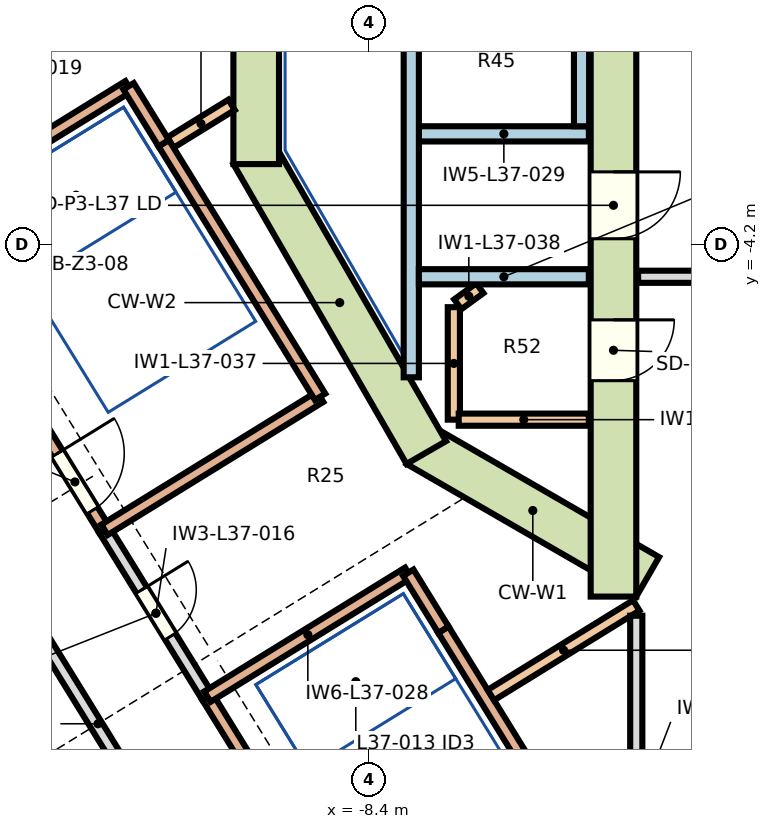
"""IFC4 building model, lengths in metres.
Left out: names, types, materials, properties, quantities, classifications, styles, units other than length and angle.
Written with IfcOpenShell. Run it as: python <this file> out.ifc"""

import sys

from ifc_helpers import new_model, si_unit, direction, frame, frame_2d, origin, place, context, subcontext, project, spatial, rectangle, extrude, element, fill, save


model = new_model("IFC4")
c1 = context("Model", 3, precision=1e-05, world=origin(), true_north=direction((0.0, 1.0)))
c2 = subcontext(c1, "Body", "Model", "MODEL_VIEW")
j1 = project(units=[si_unit("LENGTHUNIT", "METRE"), si_unit("PLANEANGLEUNIT", "RADIAN")], contexts=[c1])
p1 = place(None, origin())
s1 = spatial("IfcSite", under=j1, at=p1, CompositionType="ELEMENT")
p2 = place(p1, origin())
s2 = spatial("IfcBuilding", under=s1, at=p2, CompositionType="ELEMENT")
p3 = place(p2, frame((0.0, 0.0, 170.4)))
s3 = spatial("IfcBuildingStorey", under=s2, at=p3, CompositionType="ELEMENT", Elevation=170.4)
p4 = place(p3, frame((-3.812, -9.635, 0.0), z_axis=(0.0, 0.0, 1.0), x_axis=(-0.866013176292, 0.50002117804, 0.0)))
e1 = element("IfcWall", 1, at=p4, inside=s3, PredefinedType="SHEAR", context=c2, shape_type="SweptSolid", body=[
    extrude(rectangle(XDim=4.363, YDim=0.75, at=frame_2d((2.181, 0.0))), origin(), (0.0, 0.0, 1.0), 3.8),
])
p5 = place(p3, frame((-7.453, -7.591, 0.0), z_axis=(0.0, 0.0, 1.0), x_axis=(-0.500021842983, 0.866012792365, 0.0)))
e2 = element("IfcWall", 2, at=p5, inside=s3, PredefinedType="SHEAR", context=c2, shape_type="SweptSolid", body=[
    extrude(rectangle(XDim=5.694, YDim=0.75, at=frame_2d((2.847, 0.0))), origin(), (0.0, 0.0, 1.0), 3.8),
])
p6 = place(p3, frame((-10.25, -2.847, 0.0), z_axis=(0.0, 0.0, 1.0), x_axis=(0.0, 1.0, 0.0)))
e3 = element("IfcWall", 3, at=p6, inside=s3, PredefinedType="SHEAR", context=c2, shape_type="SweptSolid", body=[
    extrude(rectangle(XDim=5.694, YDim=0.75, at=frame_2d((2.847, 0.0))), origin(), (0.0, 0.0, 1.0), 3.8),
])
p7 = place(p3, frame((-4.375, 9.959, 0.0), z_axis=(0.0, 0.0, 1.0), x_axis=(0.0, -1.0, 0.0)))
e4 = element("IfcWall", 4, at=p7, inside=s3, PredefinedType="SHEAR", context=c2, shape_type="SweptSolid", body=[
    extrude(rectangle(XDim=19.919, YDim=0.75, at=frame_2d((9.959, 0.0))), origin(), (0.0, 0.0, 1.0), 3.8),
])
p8 = place(p7, frame((12.935, 0.0, 0.0)))
e5 = element("IfcOpeningElement", 5, at=p8, cuts=e4, PredefinedType="OPENING", context=c2, shape_type="SweptSolid", body=[
    extrude(rectangle(XDim=1.1, YDim=2.1, at=frame_2d((0.55, 1.05))), frame((0.0, 0.385, 0.0), z_axis=(0.0, -1.0, 0.0), x_axis=(1.0, 0.0, 0.0)), (0.0, 0.0, 1.0), 0.77),
])
p9 = place(p7, frame((15.368, 0.0, 0.0)))
e6 = element("IfcOpeningElement", 6, at=p9, cuts=e4, PredefinedType="OPENING", context=c2, shape_type="SweptSolid", body=[
    extrude(rectangle(XDim=1.0, YDim=2.1, at=frame_2d((0.5, 1.05))), frame((0.0, 0.385, 0.0), z_axis=(0.0, -1.0, 0.0), x_axis=(1.0, 0.0, 0.0)), (0.0, 0.0, 1.0), 0.77),
])
p10 = place(p7, frame((3.618, 0.0, 0.0)))
e7 = element("IfcOpeningElement", 7, at=p10, cuts=e4, PredefinedType="OPENING", context=c2, shape_type="SweptSolid", body=[
    extrude(rectangle(XDim=1.0, YDim=2.1, at=frame_2d((0.5, 1.05))), frame((0.0, 0.385, 0.0), z_axis=(0.0, -1.0, 0.0), x_axis=(1.0, 0.0, 0.0)), (0.0, 0.0, 1.0), 0.77),
])
p11 = place(p3, frame((-3.14, -18.444, 0.0), z_axis=(0.0, 0.0, 1.0), x_axis=(0.851111635158, 0.52498474692, 0.0)))
e8 = element("IfcWall", 8, at=p11, inside=s3, PredefinedType="SOLIDWALL", context=c2, shape_type="SweptSolid", body=[
    extrude(rectangle(XDim=16.39, YDim=0.25, at=frame_2d((8.195, 0.0))), origin(), (0.0, 0.0, 1.0), 3.5),
])
p12 = place(p11, frame((1.149, 0.0, 0.0)))
e9 = element("IfcOpeningElement", 9, at=p12, cuts=e8, PredefinedType="OPENING", context=c2, shape_type="SweptSolid", body=[
    extrude(rectangle(XDim=1.8, YDim=2.4, at=frame_2d((0.9, 1.2))), frame((0.0, 0.135, 0.0), z_axis=(0.0, -1.0, 0.0), x_axis=(1.0, 0.0, 0.0)), (0.0, 0.0, 1.0), 0.27),
])
p13 = place(p11, frame((5.246, 0.0, 0.0)))
e10 = element("IfcOpeningElement", 10, at=p13, cuts=e8, PredefinedType="OPENING", context=c2, shape_type="SweptSolid", body=[
    extrude(rectangle(XDim=1.8, YDim=2.4, at=frame_2d((0.9, 1.2))), frame((0.0, 0.135, 0.0), z_axis=(0.0, -1.0, 0.0), x_axis=(1.0, 0.0, 0.0)), (0.0, 0.0, 1.0), 0.27),
])
p14 = place(p11, frame((9.344, 0.0, 0.0)))
e11 = element("IfcOpeningElement", 11, at=p14, cuts=e8, PredefinedType="OPENING", context=c2, shape_type="SweptSolid", body=[
    extrude(rectangle(XDim=1.8, YDim=2.4, at=frame_2d((0.9, 1.2))), frame((0.0, 0.135, 0.0), z_axis=(0.0, -1.0, 0.0), x_axis=(1.0, 0.0, 0.0)), (0.0, 0.0, 1.0), 0.27),
])
p15 = place(p11, frame((13.441, 0.0, 0.0)))
e12 = element("IfcOpeningElement", 12, at=p15, cuts=e8, PredefinedType="OPENING", context=c2, shape_type="SweptSolid", body=[
    extrude(rectangle(XDim=1.8, YDim=2.4, at=frame_2d((0.9, 1.2))), frame((0.0, 0.135, 0.0), z_axis=(0.0, -1.0, 0.0), x_axis=(1.0, 0.0, 0.0)), (0.0, 0.0, 1.0), 0.27),
])
p16 = place(p3, frame((-22.037, 2.774, 0.0), z_axis=(0.0, 0.0, 1.0), x_axis=(0.524973936666, -0.85111830307, 0.0)))
e13 = element("IfcWall", 13, at=p16, inside=s3, PredefinedType="PARTITIONING", context=c2, shape_type="SweptSolid", body=[
    extrude(rectangle(XDim=27.98, YDim=0.2, at=frame_2d((13.99, 0.0))), origin(), (0.0, 0.0, 1.0), 3.55),
])
p17 = place(p16, frame((4.55, 0.0, 0.0)))
e14 = element("IfcOpeningElement", 14, at=p17, cuts=e13, PredefinedType="OPENING", context=c2, shape_type="SweptSolid", body=[
    extrude(rectangle(XDim=1.2, YDim=2.1, at=frame_2d((0.6, 1.05))), frame((0.0, 0.11, 0.0), z_axis=(0.0, -1.0, 0.0), x_axis=(1.0, 0.0, 0.0)), (0.0, 0.0, 1.0), 0.22),
])
p18 = place(p16, frame((14.085, 0.0, 0.0)))
e15 = element("IfcOpeningElement", 15, at=p18, cuts=e13, PredefinedType="OPENING", context=c2, shape_type="SweptSolid", body=[
    extrude(rectangle(XDim=1.0, YDim=2.1, at=frame_2d((0.5, 1.05))), frame((0.0, 0.11, 0.0), z_axis=(0.0, -1.0, 0.0), x_axis=(1.0, 0.0, 0.0)), (0.0, 0.0, 1.0), 0.22),
])
p19 = place(p16, frame((24.89, 0.0, 0.0)))
e16 = element("IfcOpeningElement", 16, at=p19, cuts=e13, PredefinedType="OPENING", context=c2, shape_type="SweptSolid", body=[
    extrude(rectangle(XDim=0.95, YDim=2.1, at=frame_2d((0.475, 1.05))), frame((0.0, 0.11, 0.0), z_axis=(0.0, -1.0, 0.0), x_axis=(1.0, 0.0, 0.0)), (0.0, 0.0, 1.0), 0.22),
])
p20 = place(p3, frame((-17.215, -10.759, 0.0), z_axis=(0.0, 0.0, 1.0), x_axis=(0.524974538192, -0.851117932046, 0.0)))
e17 = element("IfcWall", 17, at=p20, inside=s3, PredefinedType="PARTITIONING", context=c2, shape_type="SweptSolid", body=[
    extrude(rectangle(XDim=6.8, YDim=0.2, at=frame_2d((3.4, 0.0))), origin(), (0.0, 0.0, 1.0), 3.55),
])
p21 = place(p20, frame((2.39, 0.0, 0.0)))
e18 = element("IfcOpeningElement", 18, at=p21, cuts=e17, PredefinedType="OPENING", context=c2, shape_type="SweptSolid", body=[
    extrude(rectangle(XDim=0.9, YDim=2.1, at=frame_2d((0.45, 1.05))), frame((0.0, 0.11, 0.0), z_axis=(0.0, -1.0, 0.0), x_axis=(1.0, 0.0, 0.0)), (0.0, 0.0, 1.0), 0.22),
])
p22 = place(p20, frame((5.29, 0.0, 0.0)))
e19 = element("IfcOpeningElement", 19, at=p22, cuts=e17, PredefinedType="OPENING", context=c2, shape_type="SweptSolid", body=[
    extrude(rectangle(XDim=0.8, YDim=2.1, at=frame_2d((0.4, 1.05))), frame((0.0, 0.11, 0.0), z_axis=(0.0, -1.0, 0.0), x_axis=(1.0, 0.0, 0.0)), (0.0, 0.0, 1.0), 0.22),
])
p23 = place(p3, frame((-15.896, -3.755, 0.0), z_axis=(0.0, 0.0, 1.0), x_axis=(0.524982543144, -0.851112994493, 0.0)))
e20 = element("IfcWall", 20, at=p23, inside=s3, PredefinedType="SOLIDWALL", context=c2, shape_type="SweptSolid", body=[
    extrude(rectangle(XDim=6.0, YDim=0.2, at=frame_2d((3.0, 0.0))), origin(), (0.0, 0.0, 1.0), 3.55),
])
p24 = place(p23, frame((4.525, 0.0, 0.0)))
e21 = element("IfcOpeningElement", 21, at=p24, cuts=e20, PredefinedType="OPENING", context=c2, shape_type="SweptSolid", body=[
    extrude(rectangle(XDim=1.1, YDim=2.1, at=frame_2d((0.55, 1.05))), frame((0.0, 0.11, 0.0), z_axis=(0.0, -1.0, 0.0), x_axis=(1.0, 0.0, 0.0)), (0.0, 0.0, 1.0), 0.22),
])
p25 = place(p3, frame((-12.746, -8.861, 0.0), z_axis=(0.0, 0.0, 1.0), x_axis=(0.524959112102, -0.851127446756, 0.0)))
e22 = element("IfcWall", 22, at=p25, inside=s3, PredefinedType="PARTITIONING", context=c2, shape_type="SweptSolid", body=[
    extrude(rectangle(XDim=3.224, YDim=0.2, at=frame_2d((1.612, 0.0))), origin(), (0.0, 0.0, 1.0), 3.55),
])
p26 = place(p25, frame((1.162, 0.0, 0.0)))
e23 = element("IfcOpeningElement", 23, at=p26, cuts=e22, PredefinedType="OPENING", context=c2, shape_type="SweptSolid", body=[
    extrude(rectangle(XDim=0.9, YDim=2.1, at=frame_2d((0.45, 1.05))), frame((0.0, 0.11, 0.0), z_axis=(0.0, -1.0, 0.0), x_axis=(1.0, 0.0, 0.0)), (0.0, 0.0, 1.0), 0.22),
])
for number, where, z_axis, x_axis in (
    (24, (-12.746, -8.861, 0.0), (0.0, 0.0, 1.0), (0.851, 0.525, 0.0)),
    (25, (-12.349, -1.567, 0.0), (0.0, 0.0, 1.0), (-0.851, -0.525, 0.0)),
):
    element("IfcWall", number, at=place(p3, frame(where, z_axis=z_axis, x_axis=x_axis)), inside=s3, PredefinedType="SOLIDWALL", context=c2, shape_type="SweptSolid", body=[
        extrude(rectangle(XDim=4.167, YDim=0.2, at=frame_2d((2.083, 0.0))), origin(), (0.0, 0.0, 1.0), 3.55),
    ])
p27 = place(p3, frame((-11.053, -11.605, 0.0), z_axis=(0.0, 0.0, 1.0), x_axis=(0.524982543144, -0.851112994493, 0.0)))
e26 = element("IfcWall", 26, at=p27, inside=s3, PredefinedType="SOLIDWALL", context=c2, shape_type="SweptSolid", body=[
    extrude(rectangle(XDim=6.0, YDim=0.2, at=frame_2d((3.0, 0.0))), origin(), (0.0, 0.0, 1.0), 3.55),
])
p28 = place(p27, frame((4.525, 0.0, 0.0)))
e27 = element("IfcOpeningElement", 27, at=p28, cuts=e26, PredefinedType="OPENING", context=c2, shape_type="SweptSolid", body=[
    extrude(rectangle(XDim=1.1, YDim=2.1, at=frame_2d((0.55, 1.05))), frame((0.0, 0.11, 0.0), z_axis=(0.0, -1.0, 0.0), x_axis=(1.0, 0.0, 0.0)), (0.0, 0.0, 1.0), 0.22),
])
p29 = place(p3, frame((-10.655, -1.873, 0.0), z_axis=(0.0, 0.0, 1.0), x_axis=(-0.851083160227, -0.525030908021, 0.0)))
e28 = element("IfcWall", 28, at=p29, inside=s3, PredefinedType="PARTITIONING", context=c2, shape_type="SweptSolid", body=[
    extrude(rectangle(XDim=1.182, YDim=0.2, at=frame_2d((0.591, 0.0))), origin(), (0.0, 0.0, 1.0), 3.55),
])
p30 = place(p3, frame((-9.199, -6.674, 0.0), z_axis=(0.0, 0.0, 1.0), x_axis=(-0.524942245614, 0.851137849452, 0.0)))
e29 = element("IfcWall", 29, at=p30, inside=s3, PredefinedType="SOLIDWALL", context=c2, shape_type="SweptSolid", body=[
    extrude(rectangle(XDim=4.9, YDim=0.2, at=frame_2d((2.45, 0.0))), origin(), (0.0, 0.0, 1.0), 3.55),
])
p31 = place(p3, frame((-7.749, -9.567, 0.0), z_axis=(0.0, 0.0, 1.0), x_axis=(-0.851124503894, -0.524963883397, 0.0)))
e30 = element("IfcWall", 30, at=p31, inside=s3, PredefinedType="SOLIDWALL", context=c2, shape_type="SweptSolid", body=[
    extrude(rectangle(XDim=3.882, YDim=0.2, at=frame_2d((1.941, 0.0))), origin(), (0.0, 0.0, 1.0), 3.55),
])
p32 = place(p3, frame((-7.575, -2.35, 0.0), z_axis=(0.0, 0.0, 1.0), x_axis=(1.0, 0.0, 0.0)))
e31 = element("IfcWall", 31, at=p32, inside=s3, PredefinedType="SOLIDWALL", context=c2, shape_type="SweptSolid", body=[
    extrude(rectangle(XDim=2.795, YDim=0.25, at=frame_2d((1.397, 0.0))), origin(), (0.0, 0.0, 1.0), 3.55),
])
p33 = place(p3, frame((-7.7, 6.354, 0.0), z_axis=(0.0, 0.0, 1.0), x_axis=(0.0, -1.0, 0.0)))
e32 = element("IfcWall", 32, at=p33, inside=s3, PredefinedType="SOLIDWALL", context=c2, shape_type="SweptSolid", body=[
    extrude(rectangle(XDim=12.707, YDim=0.25, at=frame_2d((6.354, 0.0))), origin(), (0.0, 0.0, 1.0), 3.55),
])
p34 = place(p3, frame((-7.0, -7.05, 0.0), z_axis=(0.0, 0.0, 1.0), x_axis=(0.0, 1.0, 0.0)))
e33 = element("IfcWall", 33, at=p34, inside=s3, PredefinedType="PARTITIONING", context=c2, shape_type="SweptSolid", body=[
    extrude(rectangle(XDim=1.85, YDim=0.2, at=frame_2d((0.925, 0.0))), origin(), (0.0, 0.0, 1.0), 3.55),
])
p35 = place(p3, frame((-6.935, -5.153, 0.0), z_axis=(0.0, 0.0, 1.0), x_axis=(0.808147744029, 0.58897981614, 0.0)))
e34 = element("IfcWall", 34, at=p35, inside=s3, PredefinedType="PARTITIONING", context=c2, shape_type="SweptSolid", body=[
    extrude(rectangle(XDim=0.449, YDim=0.2, at=frame_2d((0.225, 0.0))), origin(), (0.0, 0.0, 1.0), 3.55),
])
p36 = place(p3, frame((-6.659, -18.5, 0.0), z_axis=(0.0, 0.0, 1.0), x_axis=(0.851115705413, 0.524978148116, 0.0)))
e35 = element("IfcWall", 35, at=p36, inside=s3, PredefinedType="PARTITIONING", context=c2, shape_type="SweptSolid", body=[
    extrude(rectangle(XDim=12.524, YDim=0.2, at=frame_2d((6.262, 0.0))), origin(), (0.0, 0.0, 1.0), 3.55),
])
p37 = place(p36, frame((2.015, 0.0, 0.0)))
e36 = element("IfcOpeningElement", 36, at=p37, cuts=e35, PredefinedType="OPENING", context=c2, shape_type="SweptSolid", body=[
    extrude(rectangle(XDim=0.9, YDim=2.1, at=frame_2d((0.45, 1.05))), frame((0.0, 0.11, 0.0), z_axis=(0.0, -1.0, 0.0), x_axis=(1.0, 0.0, 0.0)), (0.0, 0.0, 1.0), 0.22),
])
p38 = place(p36, frame((4.474, 0.0, 0.0)))
e37 = element("IfcOpeningElement", 37, at=p38, cuts=e35, PredefinedType="OPENING", context=c2, shape_type="SweptSolid", body=[
    extrude(rectangle(XDim=2.0, YDim=2.1, at=frame_2d((1.0, 1.05))), frame((0.0, 0.11, 0.0), z_axis=(0.0, -1.0, 0.0), x_axis=(1.0, 0.0, 0.0)), (0.0, 0.0, 1.0), 0.22),
])
p39 = place(p3, frame((-4.9, 4.58, 0.0), z_axis=(0.0, 0.0, 1.0), x_axis=(0.0, -1.0, 0.0)))
e38 = element("IfcWall", 38, at=p39, inside=s3, PredefinedType="SOLIDWALL", context=c2, shape_type="SweptSolid", body=[
    extrude(rectangle(XDim=6.805, YDim=0.25, at=frame_2d((3.403, 0.0))), origin(), (0.0, 0.0, 1.0), 3.55),
])
p40 = place(p3, frame((-4.78, -7.05, 0.0), z_axis=(0.0, 0.0, 1.0), x_axis=(-1.0, 0.0, 0.0)))
e39 = element("IfcWall", 39, at=p40, inside=s3, PredefinedType="PARTITIONING", context=c2, shape_type="SweptSolid", body=[
    extrude(rectangle(XDim=2.14, YDim=0.2, at=frame_2d((1.07, 0.0))), origin(), (0.0, 0.0, 1.0), 3.55),
])
p41 = place(p3, frame((-4.78, -4.7, 0.0), z_axis=(0.0, 0.0, 1.0), x_axis=(-1.0, 0.0, 0.0)))
e40 = element("IfcWall", 40, at=p41, inside=s3, PredefinedType="SOLIDWALL", context=c2, shape_type="SweptSolid", body=[
    extrude(rectangle(XDim=2.795, YDim=0.25, at=frame_2d((1.397, 0.0))), origin(), (0.0, 0.0, 1.0), 3.55),
])
p42 = place(p3, frame((-4.599, -14.674, 0.0), z_axis=(0.0, 0.0, 1.0), x_axis=(-0.524978338244, 0.85111558814, 0.0)))
e41 = element("IfcWall", 41, at=p42, inside=s3, PredefinedType="SOLIDWALL", context=c2, shape_type="SweptSolid", body=[
    extrude(rectangle(XDim=4.9, YDim=0.2, at=frame_2d((2.45, 0.0))), origin(), (0.0, 0.0, 1.0), 3.55),
])
p43 = place(p3, frame((-4.0, -10.104, 0.0), z_axis=(0.0, 0.0, 1.0), x_axis=(-0.851117804286, -0.524974745323, 0.0)))
e42 = element("IfcWall", 42, at=p43, inside=s3, PredefinedType="PARTITIONING", context=c2, shape_type="SweptSolid", body=[
    extrude(rectangle(XDim=2.809, YDim=0.2, at=frame_2d((1.405, 0.0))), origin(), (0.0, 0.0, 1.0), 3.55),
])
p44 = place(p3, frame((-4.0, -10.274, 0.0), z_axis=(0.0, 0.0, 1.0), x_axis=(0.0, -1.0, 0.0)))
e43 = element("IfcWall", 43, at=p44, inside=s3, PredefinedType="PARTITIONING", context=c2, shape_type="SweptSolid", body=[
    extrude(rectangle(XDim=6.426, YDim=0.2, at=frame_2d((3.213, 0.0))), origin(), (0.0, 0.0, 1.0), 3.55),
])
p45 = place(p3, frame((0.8, -4.7, 0.0), z_axis=(0.0, 0.0, 1.0), x_axis=(-1.0, 0.0, 0.0)))
e44 = element("IfcWall", 44, at=p45, inside=s3, PredefinedType="PARTITIONING", context=c2, shape_type="SweptSolid", body=[
    extrude(rectangle(XDim=4.77, YDim=0.2, at=frame_2d((2.385, 0.0))), origin(), (0.0, 0.0, 1.0), 3.55),
])
p46 = place(p45, frame((1.4, 0.0, 0.0)))
e45 = element("IfcOpeningElement", 45, at=p46, cuts=e44, PredefinedType="OPENING", context=c2, shape_type="SweptSolid", body=[
    extrude(rectangle(XDim=2.0, YDim=2.1, at=frame_2d((1.0, 1.05))), frame((0.0, 0.11, 0.0), z_axis=(0.0, -1.0, 0.0), x_axis=(1.0, 0.0, 0.0)), (0.0, 0.0, 1.0), 0.22),
])
for number, where, z_axis, x_axis in (
    (46, (-11.772, -2.503, 0.0), (0.0, 0.0, 1.0), (-0.525, 0.851, 0.0)),
    (47, (-7.172, -10.503, 0.0), (0.0, 0.0, 1.0), (-0.525, 0.851, 0.0)),
):
    element("IfcWall", number, at=place(p3, frame(where, z_axis=z_axis, x_axis=x_axis)), inside=s3, PredefinedType="SOLIDWALL", context=c2, shape_type="SweptSolid", body=[
        extrude(rectangle(XDim=1.1, YDim=0.2, at=frame_2d((0.55, 0.0))), origin(), (0.0, 0.0, 1.0), 3.55),
    ])
p47 = place(p24, origin())
e48 = element("IfcDoor", 48, at=p47, inside=s3, OperationType="NOTDEFINED", PredefinedType="DOOR", context=c2, shape_type="SweptSolid", body=[
    extrude(rectangle(XDim=1.1, YDim=2.1, at=frame_2d((0.55, 1.05))), frame((0.0, 0.025, 0.0), z_axis=(0.0, -1.0, 0.0), x_axis=(1.0, 0.0, 0.0)), (0.0, 0.0, 1.0), 0.05),
])
fill(e21, e48)
p48 = place(p26, origin())
e49 = element("IfcDoor", 49, at=p48, inside=s3, OperationType="NOTDEFINED", PredefinedType="DOOR", context=c2, shape_type="SweptSolid", body=[
    extrude(rectangle(XDim=0.9, YDim=2.1, at=frame_2d((0.45, 1.05))), frame((0.0, 0.025, 0.0), z_axis=(0.0, -1.0, 0.0), x_axis=(1.0, 0.0, 0.0)), (0.0, 0.0, 1.0), 0.05),
])
fill(e23, e49)
p49 = place(p8, origin())
e50 = element("IfcDoor", 50, at=p49, inside=s3, OperationType="SLIDING_TO_LEFT", PredefinedType="DOOR", context=c2, shape_type="SweptSolid", body=[
    extrude(rectangle(XDim=1.1, YDim=2.1, at=frame_2d((0.55, 1.05))), frame((0.0, 0.025, 0.0), z_axis=(0.0, -1.0, 0.0), x_axis=(1.0, 0.0, 0.0)), (0.0, 0.0, 1.0), 0.05),
])
fill(e5, e50)
p50 = place(p9, origin())
e51 = element("IfcDoor", 51, at=p50, inside=s3, OperationType="NOTDEFINED", PredefinedType="DOOR", context=c2, shape_type="SweptSolid", body=[
    extrude(rectangle(XDim=1.0, YDim=2.1, at=frame_2d((0.5, 1.05))), frame((0.0, 0.025, 0.0), z_axis=(0.0, -1.0, 0.0), x_axis=(1.0, 0.0, 0.0)), (0.0, 0.0, 1.0), 0.05),
])
fill(e6, e51)
save(model, sys.argv[1])
